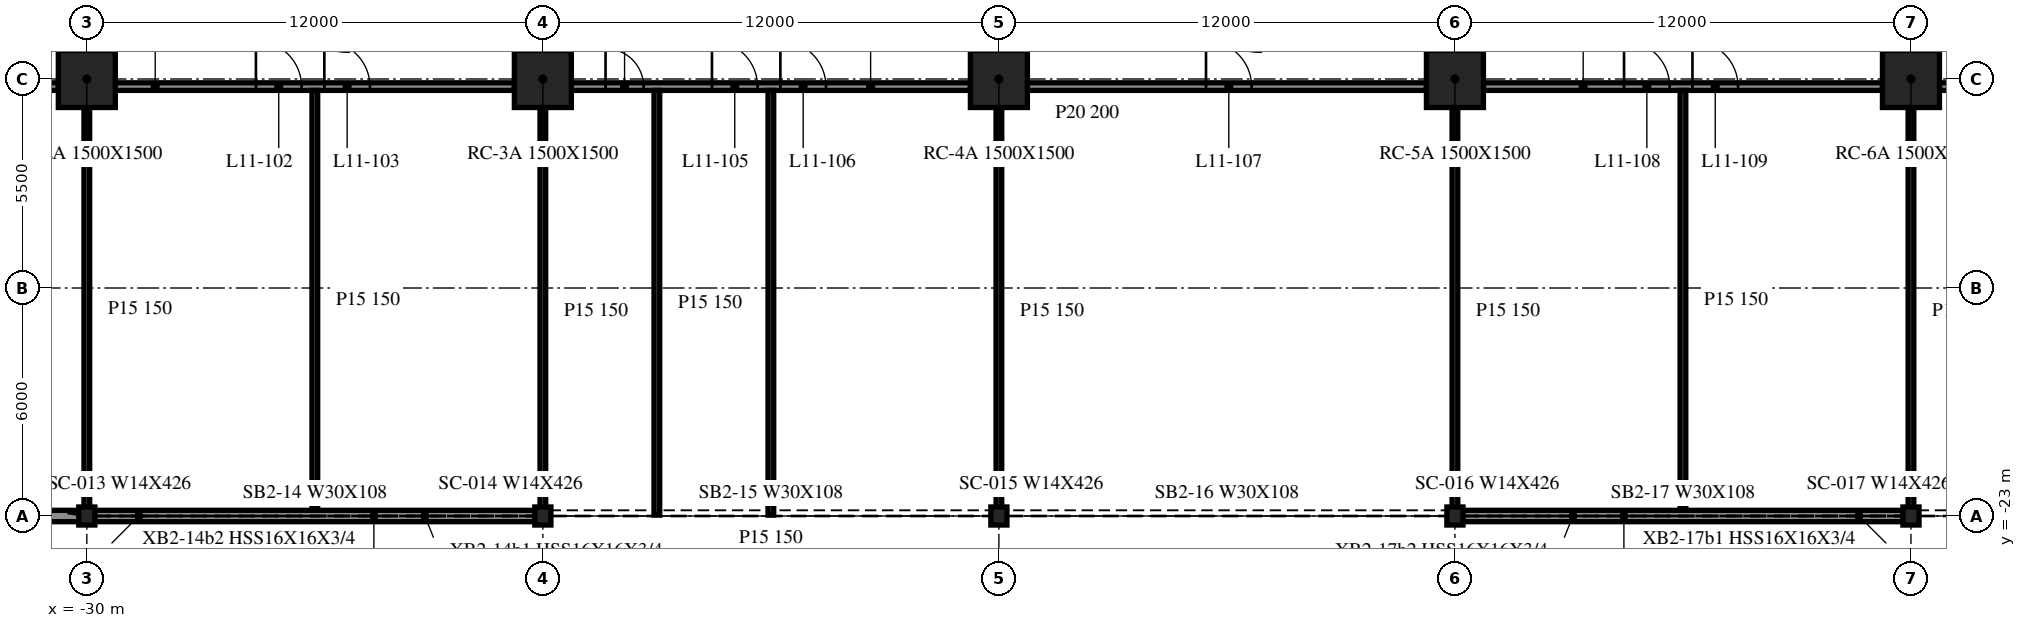
"""IFC4 building model, lengths in metres.
Left out: names, types, materials, properties, quantities, classifications, styles, units other than length and angle.
Written with IfcOpenShell. Run it as: python <this file> out.ifc"""

import sys

from ifc_helpers import new_model, si_unit, direction, frame, frame_2d, origin, origin_2d, place, context, subcontext, project, spatial, rectangle, i_section, extrude, element, fill, save


model = new_model("IFC4")
c1 = context("Model", 3, precision=1e-05, world=origin(), true_north=direction((0.0, 1.0)))
c2 = subcontext(c1, "Body", "Model", "MODEL_VIEW")
j1 = project(units=[si_unit("LENGTHUNIT", "METRE"), si_unit("PLANEANGLEUNIT", "RADIAN")], contexts=[c1])
p1 = place(None, origin())
s1 = spatial("IfcSite", under=j1, at=p1, CompositionType="ELEMENT")
p2 = place(p1, origin())
s2 = spatial("IfcBuilding", under=s1, at=p2, CompositionType="ELEMENT")
p3 = place(p2, frame((0.0, 0.0, 50.3)))
s3 = spatial("IfcBuildingStorey", under=s2, at=p3, CompositionType="ELEMENT", Elevation=50.3)
for number, where, z_axis, x_axis in (
    (1, (-30.0, -11.5, -0.34), (0.0, 0.0, 1.0), (1.0, 0.0, 0.0)),
    (2, (-18.0, -11.5, -0.34), (0.0, 0.0, 1.0), (1.0, 0.0, 0.0)),
    (3, (-6.0, -11.5, -0.34), (0.0, 0.0, 1.0), (1.0, 0.0, 0.0)),
    (4, (6.0, -11.5, -0.34), (0.0, 0.0, 1.0), (1.0, 0.0, 0.0)),
    (5, (18.0, -11.5, -0.34), (0.0, 0.0, 1.0), (1.0, 0.0, 0.0)),
):
    element("IfcColumn", number, at=place(p3, frame(where, z_axis=z_axis, x_axis=x_axis)), inside=s3, PredefinedType="COLUMN", context=c2, shape_type="SweptSolid", body=[
        extrude(rectangle(XDim=1.5, YDim=1.5, at=origin_2d()), origin(), (0.0, 0.0, 1.0), 4.3),
    ])
for number, where, z_axis, x_axis in (
    (6, (-30.0, -23.0, -0.34), (0.0, 0.0, 1.0), (1.0, 0.0, 0.0)),
    (7, (-18.0, -23.0, -0.34), (0.0, 0.0, 1.0), (1.0, 0.0, 0.0)),
    (8, (-6.0, -23.0, -0.34), (0.0, 0.0, 1.0), (1.0, 0.0, 0.0)),
    (9, (6.0, -23.0, -0.34), (0.0, 0.0, 1.0), (1.0, 0.0, 0.0)),
    (10, (18.0, -23.0, -0.34), (0.0, 0.0, 1.0), (1.0, 0.0, 0.0)),
):
    element("IfcColumn", number, at=place(p3, frame(where, z_axis=z_axis, x_axis=x_axis)), inside=s3, PredefinedType="COLUMN", context=c2, shape_type="SweptSolid", body=[
        extrude(i_section(OverallWidth=0.424, OverallDepth=0.475, WebThickness=0.048, FlangeThickness=0.077, at=origin_2d()), origin(), (0.0, 0.0, 1.0), 4.3),
    ])
p4 = place(p3, frame((-36.0, -23.0, 0.0), z_axis=(0.0, 0.0, 1.0), x_axis=(1.0, 0.0, 0.0)))
e11 = element("IfcWall", 11, at=p4, inside=s3, PredefinedType="NOTDEFINED", context=c2, shape_type="SweptSolid", body=[
    extrude(rectangle(XDim=5.976, YDim=0.3, at=frame_2d((2.988, 0.0))), origin(), (0.0, 0.0, 1.0), 3.203),
])
for number, where, z_axis, x_axis in (
    (12, (-29.976, -23.0, 0.0), (0.0, 0.0, 1.0), (1.0, 0.0, 0.0)),
    (13, (6.024, -23.0, 0.0), (0.0, 0.0, 1.0), (1.0, 0.0, 0.0)),
):
    element("IfcWall", number, at=place(p3, frame(where, z_axis=z_axis, x_axis=x_axis)), inside=s3, PredefinedType="NOTDEFINED", context=c2, shape_type="SweptSolid", body=[
        extrude(rectangle(XDim=11.952, YDim=0.3, at=frame_2d((5.976, 0.0))), origin(), (0.0, 0.0, 1.0), 3.203),
    ])
p5 = place(p3, frame((-41.25, -11.7, 0.0), z_axis=(0.0, 0.0, 1.0), x_axis=(1.0, 0.0, 0.0)))
e14 = element("IfcWall", 14, at=p5, inside=s3, PredefinedType="PARTITIONING", context=c2, shape_type="SweptSolid", body=[
    extrude(rectangle(XDim=10.5, YDim=0.2, at=frame_2d((5.25, 0.0))), origin(), (0.0, 0.0, 1.0), 3.96),
])
p6 = place(p5, frame((4.7, 0.0, 0.0)))
e15 = element("IfcOpeningElement", 15, at=p6, cuts=e14, PredefinedType="OPENING", context=c2, shape_type="SweptSolid", body=[
    extrude(rectangle(XDim=1.2, YDim=2.1, at=frame_2d((0.6, 1.05))), frame((0.0, 0.11, 0.0), z_axis=(0.0, -1.0, 0.0), x_axis=(1.0, 0.0, 0.0)), (0.0, 0.0, 1.0), 0.22),
])
p7 = place(p3, frame((-29.25, -11.7, 0.0), z_axis=(0.0, 0.0, 1.0), x_axis=(1.0, 0.0, 0.0)))
e16 = element("IfcWall", 16, at=p7, inside=s3, PredefinedType="PARTITIONING", context=c2, shape_type="SweptSolid", body=[
    extrude(rectangle(XDim=10.5, YDim=0.2, at=frame_2d((5.25, 0.0))), origin(), (0.0, 0.0, 1.0), 3.96),
])
p8 = place(p7, frame((3.7, 0.0, 0.0)))
e17 = element("IfcOpeningElement", 17, at=p8, cuts=e16, PredefinedType="OPENING", context=c2, shape_type="SweptSolid", body=[
    extrude(rectangle(XDim=1.2, YDim=2.1, at=frame_2d((0.6, 1.05))), frame((0.0, 0.11, 0.0), z_axis=(0.0, -1.0, 0.0), x_axis=(1.0, 0.0, 0.0)), (0.0, 0.0, 1.0), 0.22),
])
p9 = place(p7, frame((5.5, 0.0, 0.0)))
e18 = element("IfcOpeningElement", 18, at=p9, cuts=e16, PredefinedType="OPENING", context=c2, shape_type="SweptSolid", body=[
    extrude(rectangle(XDim=1.2, YDim=2.1, at=frame_2d((0.6, 1.05))), frame((0.0, 0.11, 0.0), z_axis=(0.0, -1.0, 0.0), x_axis=(1.0, 0.0, 0.0)), (0.0, 0.0, 1.0), 0.22),
])
p10 = place(p3, frame((-17.25, -11.7, 0.0), z_axis=(0.0, 0.0, 1.0), x_axis=(1.0, 0.0, 0.0)))
e19 = element("IfcWall", 19, at=p10, inside=s3, PredefinedType="PARTITIONING", context=c2, shape_type="SweptSolid", body=[
    extrude(rectangle(XDim=10.5, YDim=0.2, at=frame_2d((5.25, 0.0))), origin(), (0.0, 0.0, 1.0), 3.96),
])
p11 = place(p10, frame((0.9, 0.0, 0.0)))
e20 = element("IfcOpeningElement", 20, at=p11, cuts=e19, PredefinedType="OPENING", context=c2, shape_type="SweptSolid", body=[
    extrude(rectangle(XDim=1.0, YDim=2.1, at=frame_2d((0.5, 1.05))), frame((0.0, 0.11, 0.0), z_axis=(0.0, -1.0, 0.0), x_axis=(1.0, 0.0, 0.0)), (0.0, 0.0, 1.0), 0.22),
])
p12 = place(p10, frame((3.7, 0.0, 0.0)))
e21 = element("IfcOpeningElement", 21, at=p12, cuts=e19, PredefinedType="OPENING", context=c2, shape_type="SweptSolid", body=[
    extrude(rectangle(XDim=1.2, YDim=2.1, at=frame_2d((0.6, 1.05))), frame((0.0, 0.11, 0.0), z_axis=(0.0, -1.0, 0.0), x_axis=(1.0, 0.0, 0.0)), (0.0, 0.0, 1.0), 0.22),
])
p13 = place(p10, frame((5.5, 0.0, 0.0)))
e22 = element("IfcOpeningElement", 22, at=p13, cuts=e19, PredefinedType="OPENING", context=c2, shape_type="SweptSolid", body=[
    extrude(rectangle(XDim=1.2, YDim=2.1, at=frame_2d((0.6, 1.05))), frame((0.0, 0.11, 0.0), z_axis=(0.0, -1.0, 0.0), x_axis=(1.0, 0.0, 0.0)), (0.0, 0.0, 1.0), 0.22),
])
p14 = place(p3, frame((-5.25, -11.7, 0.0), z_axis=(0.0, 0.0, 1.0), x_axis=(1.0, 0.0, 0.0)))
e23 = element("IfcWall", 23, at=p14, inside=s3, PredefinedType="PARTITIONING", context=c2, shape_type="SweptSolid", body=[
    extrude(rectangle(XDim=10.5, YDim=0.2, at=frame_2d((5.25, 0.0))), origin(), (0.0, 0.0, 1.0), 3.96),
])
p15 = place(p14, frame((4.7, 0.0, 0.0)))
e24 = element("IfcOpeningElement", 24, at=p15, cuts=e23, PredefinedType="OPENING", context=c2, shape_type="SweptSolid", body=[
    extrude(rectangle(XDim=1.2, YDim=2.1, at=frame_2d((0.6, 1.05))), frame((0.0, 0.11, 0.0), z_axis=(0.0, -1.0, 0.0), x_axis=(1.0, 0.0, 0.0)), (0.0, 0.0, 1.0), 0.22),
])
p16 = place(p3, frame((6.75, -11.7, 0.0), z_axis=(0.0, 0.0, 1.0), x_axis=(1.0, 0.0, 0.0)))
e25 = element("IfcWall", 25, at=p16, inside=s3, PredefinedType="PARTITIONING", context=c2, shape_type="SweptSolid", body=[
    extrude(rectangle(XDim=10.5, YDim=0.2, at=frame_2d((5.25, 0.0))), origin(), (0.0, 0.0, 1.0), 3.96),
])
p17 = place(p16, frame((3.7, 0.0, 0.0)))
e26 = element("IfcOpeningElement", 26, at=p17, cuts=e25, PredefinedType="OPENING", context=c2, shape_type="SweptSolid", body=[
    extrude(rectangle(XDim=1.2, YDim=2.1, at=frame_2d((0.6, 1.05))), frame((0.0, 0.11, 0.0), z_axis=(0.0, -1.0, 0.0), x_axis=(1.0, 0.0, 0.0)), (0.0, 0.0, 1.0), 0.22),
])
p18 = place(p16, frame((5.5, 0.0, 0.0)))
e27 = element("IfcOpeningElement", 27, at=p18, cuts=e25, PredefinedType="OPENING", context=c2, shape_type="SweptSolid", body=[
    extrude(rectangle(XDim=1.2, YDim=2.1, at=frame_2d((0.6, 1.05))), frame((0.0, 0.11, 0.0), z_axis=(0.0, -1.0, 0.0), x_axis=(1.0, 0.0, 0.0)), (0.0, 0.0, 1.0), 0.22),
])
p19 = place(p3, frame((18.75, -11.7, 0.0), z_axis=(0.0, 0.0, 1.0), x_axis=(1.0, 0.0, 0.0)))
e28 = element("IfcWall", 28, at=p19, inside=s3, PredefinedType="PARTITIONING", context=c2, shape_type="SweptSolid", body=[
    extrude(rectangle(XDim=10.5, YDim=0.2, at=frame_2d((5.25, 0.0))), origin(), (0.0, 0.0, 1.0), 3.96),
])
p20 = place(p19, frame((0.9, 0.0, 0.0)))
e29 = element("IfcOpeningElement", 29, at=p20, cuts=e28, PredefinedType="OPENING", context=c2, shape_type="SweptSolid", body=[
    extrude(rectangle(XDim=1.0, YDim=2.1, at=frame_2d((0.5, 1.05))), frame((0.0, 0.11, 0.0), z_axis=(0.0, -1.0, 0.0), x_axis=(1.0, 0.0, 0.0)), (0.0, 0.0, 1.0), 0.22),
])
p21 = place(p19, frame((3.7, 0.0, 0.0)))
e30 = element("IfcOpeningElement", 30, at=p21, cuts=e28, PredefinedType="OPENING", context=c2, shape_type="SweptSolid", body=[
    extrude(rectangle(XDim=1.2, YDim=2.1, at=frame_2d((0.6, 1.05))), frame((0.0, 0.11, 0.0), z_axis=(0.0, -1.0, 0.0), x_axis=(1.0, 0.0, 0.0)), (0.0, 0.0, 1.0), 0.22),
])
p22 = place(p19, frame((5.5, 0.0, 0.0)))
e31 = element("IfcOpeningElement", 31, at=p22, cuts=e28, PredefinedType="OPENING", context=c2, shape_type="SweptSolid", body=[
    extrude(rectangle(XDim=1.2, YDim=2.1, at=frame_2d((0.6, 1.05))), frame((0.0, 0.11, 0.0), z_axis=(0.0, -1.0, 0.0), x_axis=(1.0, 0.0, 0.0)), (0.0, 0.0, 1.0), 0.22),
])
p23 = place(p3, frame((-30.0, -22.85, 0.0), z_axis=(0.0, 0.0, 1.0), x_axis=(0.0, 1.0, 0.0)))
e32 = element("IfcWall", 32, at=p23, inside=s3, PredefinedType="PARTITIONING", context=c2, shape_type="SweptSolid", body=[
    extrude(rectangle(XDim=10.6, YDim=0.15, at=frame_2d((5.3, 0.0))), origin(), (0.0, 0.0, 1.0), 3.96),
])
p24 = place(p3, frame((-24.0, -22.85, 0.0), z_axis=(0.0, 0.0, 1.0), x_axis=(0.0, 1.0, 0.0)))
e33 = element("IfcWall", 33, at=p24, inside=s3, PredefinedType="PARTITIONING", context=c2, shape_type="SweptSolid", body=[
    extrude(rectangle(XDim=11.05, YDim=0.15, at=frame_2d((5.525, 0.0))), origin(), (0.0, 0.0, 1.0), 3.96),
])
p25 = place(p3, frame((-18.0, -22.975, 0.0), z_axis=(0.0, 0.0, 1.0), x_axis=(0.0, 1.0, 0.0)))
e34 = element("IfcWall", 34, at=p25, inside=s3, PredefinedType="PARTITIONING", context=c2, shape_type="SweptSolid", body=[
    extrude(rectangle(XDim=10.725, YDim=0.15, at=frame_2d((5.363, 0.0))), origin(), (0.0, 0.0, 1.0), 3.96),
])
for number, where, z_axis, x_axis in (
    (35, (-15.0, -22.975, 0.0), (0.0, 0.0, 1.0), (0.0, 1.0, 0.0)),
    (36, (-12.0, -22.975, 0.0), (0.0, 0.0, 1.0), (0.0, 1.0, 0.0)),
):
    element("IfcWall", number, at=place(p3, frame(where, z_axis=z_axis, x_axis=x_axis)), inside=s3, PredefinedType="PARTITIONING", context=c2, shape_type="SweptSolid", body=[
        extrude(rectangle(XDim=11.175, YDim=0.15, at=frame_2d((5.587, 0.0))), origin(), (0.0, 0.0, 1.0), 3.96),
    ])
for number, where, z_axis, x_axis in (
    (37, (-6.0, -22.975, 0.0), (0.0, 0.0, 1.0), (0.0, 1.0, 0.0)),
    (38, (6.0, -22.975, 0.0), (0.0, 0.0, 1.0), (0.0, 1.0, 0.0)),
):
    element("IfcWall", number, at=place(p3, frame(where, z_axis=z_axis, x_axis=x_axis)), inside=s3, PredefinedType="PARTITIONING", context=c2, shape_type="SweptSolid", body=[
        extrude(rectangle(XDim=10.725, YDim=0.15, at=frame_2d((5.363, 0.0))), origin(), (0.0, 0.0, 1.0), 3.96),
    ])
p26 = place(p3, frame((12.0, -22.85, 0.0), z_axis=(0.0, 0.0, 1.0), x_axis=(0.0, 1.0, 0.0)))
e39 = element("IfcWall", 39, at=p26, inside=s3, PredefinedType="PARTITIONING", context=c2, shape_type="SweptSolid", body=[
    extrude(rectangle(XDim=11.05, YDim=0.15, at=frame_2d((5.525, 0.0))), origin(), (0.0, 0.0, 1.0), 3.96),
])
p27 = place(p3, frame((18.0, -22.975, 0.0), z_axis=(0.0, 0.0, 1.0), x_axis=(0.0, 1.0, 0.0)))
e40 = element("IfcWall", 40, at=p27, inside=s3, PredefinedType="PARTITIONING", context=c2, shape_type="SweptSolid", body=[
    extrude(rectangle(XDim=10.725, YDim=0.15, at=frame_2d((5.363, 0.0))), origin(), (0.0, 0.0, 1.0), 3.96),
])
p28 = place(p8, origin())
e41 = element("IfcDoor", 41, at=p28, inside=s3, OperationType="SINGLE_SWING_RIGHT", PredefinedType="DOOR", context=c2, shape_type="SweptSolid", body=[
    extrude(rectangle(XDim=1.2, YDim=2.1, at=frame_2d((0.6, 1.05))), frame((0.0, 0.025, 0.0), z_axis=(0.0, -1.0, 0.0), x_axis=(1.0, 0.0, 0.0)), (0.0, 0.0, 1.0), 0.05),
])
fill(e17, e41)
p29 = place(p9, origin())
e42 = element("IfcDoor", 42, at=p29, inside=s3, OperationType="SINGLE_SWING_LEFT", PredefinedType="DOOR", context=c2, shape_type="SweptSolid", body=[
    extrude(rectangle(XDim=1.2, YDim=2.1, at=frame_2d((0.6, 1.05))), frame((0.0, 0.025, 0.0), z_axis=(0.0, -1.0, 0.0), x_axis=(1.0, 0.0, 0.0)), (0.0, 0.0, 1.0), 0.05),
])
fill(e18, e42)
p30 = place(p11, origin())
e43 = element("IfcDoor", 43, at=p30, inside=s3, OperationType="SINGLE_SWING_RIGHT", PredefinedType="DOOR", context=c2, shape_type="SweptSolid", body=[
    extrude(rectangle(XDim=1.0, YDim=2.1, at=frame_2d((0.5, 1.05))), frame((0.0, 0.025, 0.0), z_axis=(0.0, -1.0, 0.0), x_axis=(1.0, 0.0, 0.0)), (0.0, 0.0, 1.0), 0.05),
])
fill(e20, e43)
p31 = place(p12, origin())
e44 = element("IfcDoor", 44, at=p31, inside=s3, OperationType="SINGLE_SWING_RIGHT", PredefinedType="DOOR", context=c2, shape_type="SweptSolid", body=[
    extrude(rectangle(XDim=1.2, YDim=2.1, at=frame_2d((0.6, 1.05))), frame((0.0, 0.025, 0.0), z_axis=(0.0, -1.0, 0.0), x_axis=(1.0, 0.0, 0.0)), (0.0, 0.0, 1.0), 0.05),
])
fill(e21, e44)
p32 = place(p13, origin())
e45 = element("IfcDoor", 45, at=p32, inside=s3, OperationType="SINGLE_SWING_LEFT", PredefinedType="DOOR", context=c2, shape_type="SweptSolid", body=[
    extrude(rectangle(XDim=1.2, YDim=2.1, at=frame_2d((0.6, 1.05))), frame((0.0, 0.025, 0.0), z_axis=(0.0, -1.0, 0.0), x_axis=(1.0, 0.0, 0.0)), (0.0, 0.0, 1.0), 0.05),
])
fill(e22, e45)
p33 = place(p15, origin())
e46 = element("IfcDoor", 46, at=p33, inside=s3, OperationType="SINGLE_SWING_LEFT", PredefinedType="DOOR", context=c2, shape_type="SweptSolid", body=[
    extrude(rectangle(XDim=1.2, YDim=2.1, at=frame_2d((0.6, 1.05))), frame((0.0, 0.025, 0.0), z_axis=(0.0, -1.0, 0.0), x_axis=(1.0, 0.0, 0.0)), (0.0, 0.0, 1.0), 0.05),
])
fill(e24, e46)
p34 = place(p17, origin())
e47 = element("IfcDoor", 47, at=p34, inside=s3, OperationType="SINGLE_SWING_RIGHT", PredefinedType="DOOR", context=c2, shape_type="SweptSolid", body=[
    extrude(rectangle(XDim=1.2, YDim=2.1, at=frame_2d((0.6, 1.05))), frame((0.0, 0.025, 0.0), z_axis=(0.0, -1.0, 0.0), x_axis=(1.0, 0.0, 0.0)), (0.0, 0.0, 1.0), 0.05),
])
fill(e26, e47)
p35 = place(p18, origin())
e48 = element("IfcDoor", 48, at=p35, inside=s3, OperationType="SINGLE_SWING_LEFT", PredefinedType="DOOR", context=c2, shape_type="SweptSolid", body=[
    extrude(rectangle(XDim=1.2, YDim=2.1, at=frame_2d((0.6, 1.05))), frame((0.0, 0.025, 0.0), z_axis=(0.0, -1.0, 0.0), x_axis=(1.0, 0.0, 0.0)), (0.0, 0.0, 1.0), 0.05),
])
fill(e27, e48)
save(model, sys.argv[1])
